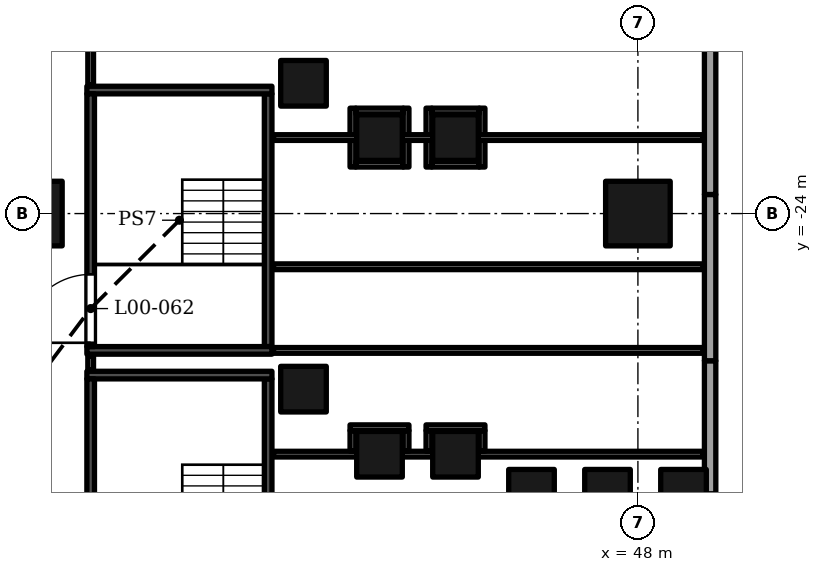
"""IFC4 building model, lengths in metres.
Left out: names, types, materials, properties, quantities, classifications, styles, units other than length and angle.
Written with IfcOpenShell. Run it as: python <this file> out.ifc"""

import sys

from ifc_helpers import new_model, si_unit, direction, frame, frame_2d, origin, origin_2d, place, context, subcontext, project, spatial, rectangle, extrude, element, fill, save


model = new_model("IFC4")
c1 = context("Model", 3, precision=1e-05, world=origin(), true_north=direction((0.0, 1.0)))
c2 = subcontext(c1, "Body", "Model", "MODEL_VIEW")
j1 = project(units=[si_unit("LENGTHUNIT", "METRE"), si_unit("PLANEANGLEUNIT", "RADIAN")], contexts=[c1])
p1 = place(None, origin())
s1 = spatial("IfcSite", under=j1, at=p1, CompositionType="ELEMENT")
p2 = place(p1, origin())
s2 = spatial("IfcBuilding", under=s1, at=p2, CompositionType="ELEMENT")
p3 = place(p2, origin())
s3 = spatial("IfcBuildingStorey", under=s2, at=p3, CompositionType="ELEMENT", Elevation=0.0)
for number, where, z_axis, x_axis in (
    (1, (32.0, -24.0, 0.0), (0.0, 0.0, 1.0), (1.0, 0.0, 0.0)),
    (2, (48.0, -24.0, 0.0), (0.0, 0.0, 1.0), (1.0, 0.0, 0.0)),
):
    element("IfcColumn", number, at=place(p3, frame(where, z_axis=z_axis, x_axis=x_axis)), inside=s3, PredefinedType="COLUMN", context=c2, shape_type="SweptSolid", body=[
        extrude(rectangle(XDim=1.7, YDim=1.7, at=origin_2d()), origin(), (0.0, 0.0, 1.0), 9.0),
    ])
for number, where, z_axis, x_axis in (
    (3, (39.2, -20.572, 0.0), (0.0, 0.0, 1.0), (1.0, 0.0, 0.0)),
    (4, (39.2, -28.62, 0.0), (0.0, 0.0, 1.0), (1.0, 0.0, 0.0)),
    (5, (41.2, -22.001, 0.0), (0.0, 0.0, 1.0), (1.0, 0.0, 0.0)),
    (6, (41.2, -30.333, 0.0), (0.0, 0.0, 1.0), (1.0, 0.0, 0.0)),
    (7, (43.2, -22.001, 0.0), (0.0, 0.0, 1.0), (1.0, 0.0, 0.0)),
    (8, (43.2, -30.333, 0.0), (0.0, 0.0, 1.0), (1.0, 0.0, 0.0)),
    (9, (45.2, -31.333, 0.0), (0.0, 0.0, 1.0), (1.0, 0.0, 0.0)),
    (10, (47.2, -31.333, 0.0), (0.0, 0.0, 1.0), (1.0, 0.0, 0.0)),
    (11, (49.2, -31.333, 0.0), (0.0, 0.0, 1.0), (1.0, 0.0, 0.0)),
):
    element("IfcColumn", number, at=place(p3, frame(where, z_axis=z_axis, x_axis=x_axis)), inside=s3, PredefinedType="COLUMN", context=c2, shape_type="SweptSolid", body=[
        extrude(rectangle(XDim=1.2, YDim=1.2, at=origin_2d()), origin(), (0.0, 0.0, 1.0), 9.0),
    ])
p4 = place(p3, frame((49.9, -31.373, 0.0), z_axis=(0.0, 0.0, 1.0), x_axis=(0.0, 1.0, 0.0)))
e12 = element("IfcWall", 12, at=p4, inside=s3, PredefinedType="ELEMENTEDWALL", context=c2, shape_type="SweptSolid", body=[
    extrude(rectangle(XDim=3.5, YDim=0.3, at=frame_2d((1.75, 0.0))), origin(), (0.0, 0.0, 1.0), 7.6),
])
p5 = place(p4, frame((1.627, 0.0, 0.0)))
e13 = element("IfcOpeningElement", 13, at=p5, cuts=e12, PredefinedType="OPENING", context=c2, shape_type="SweptSolid", body=[
    extrude(rectangle(XDim=1.5, YDim=2.7, at=frame_2d((0.75, 1.35))), frame((0.0, 0.16, 0.0), z_axis=(0.0, -1.0, 0.0), x_axis=(1.0, 0.0, 0.0)), (0.0, 0.0, 1.0), 0.32),
])
p6 = place(p3, frame((49.9, -27.873, 0.0), z_axis=(0.0, 0.0, 1.0), x_axis=(0.0, 1.0, 0.0)))
e14 = element("IfcWall", 14, at=p6, inside=s3, PredefinedType="ELEMENTEDWALL", context=c2, shape_type="SweptSolid", body=[
    extrude(rectangle(XDim=4.375, YDim=0.3, at=frame_2d((2.188, 0.0))), origin(), (0.0, 0.0, 1.0), 7.6),
])
p7 = place(p6, frame((0.373, 0.0, 0.0)))
e15 = element("IfcOpeningElement", 15, at=p7, cuts=e14, PredefinedType="OPENING", context=c2, shape_type="SweptSolid", body=[
    extrude(rectangle(XDim=2.0, YDim=2.4, at=frame_2d((1.0, 1.2))), frame((0.0, 0.16, 0.0), z_axis=(0.0, -1.0, 0.0), x_axis=(1.0, 0.0, 0.0)), (0.0, 0.0, 1.0), 0.32),
])
p8 = place(p3, frame((49.9, -23.498, 0.0), z_axis=(0.0, 0.0, 1.0), x_axis=(0.0, 1.0, 0.0)))
e16 = element("IfcWall", 16, at=p8, inside=s3, PredefinedType="ELEMENTEDWALL", context=c2, shape_type="SweptSolid", body=[
    extrude(rectangle(XDim=8.55, YDim=0.3, at=frame_2d((4.275, 0.0))), origin(), (0.0, 0.0, 1.0), 7.6),
])
p9 = place(p8, frame((2.002, 0.0, 0.0)))
e17 = element("IfcOpeningElement", 17, at=p9, cuts=e16, PredefinedType="OPENING", context=c2, shape_type="SweptSolid", body=[
    extrude(rectangle(XDim=3.0, YDim=2.7, at=frame_2d((1.5, 1.35))), frame((0.0, 0.16, 0.0), z_axis=(0.0, -1.0, 0.0), x_axis=(1.0, 0.0, 0.0)), (0.0, 0.0, 1.0), 0.32),
])
for number, where, z_axis, x_axis in (
    (18, (49.85, -39.79, 9.0), (0.0, 0.0, 1.0), (0.0, 1.0, 0.0)),
    (19, (49.85, -25.093, 9.0), (0.0, 0.0, 1.0), (0.0, 1.0, 0.0)),
):
    element("IfcWall", number, at=place(p3, frame(where, z_axis=z_axis, x_axis=x_axis)), inside=s3, PredefinedType="PARAPET", context=c2, shape_type="SweptSolid", body=[
        extrude(rectangle(XDim=14.698, YDim=0.3, at=frame_2d((7.349, 0.0))), origin(), (0.0, 0.0, 1.0), 1.1),
    ])
p10 = place(p3, frame((33.5, -28.25, 0.0), z_axis=(0.0, 0.0, 1.0), x_axis=(1.0, 0.0, 0.0)))
e20 = element("IfcWall", 20, at=p10, inside=s3, PredefinedType="SOLIDWALL", context=c2, shape_type="SweptSolid", body=[
    extrude(rectangle(XDim=4.87, YDim=0.2, at=frame_2d((2.435, 0.0))), origin(), (0.0, 0.0, 1.0), 8.5),
])
p11 = place(p3, frame((33.6, -35.0, 0.0), z_axis=(0.0, 0.0, 1.0), x_axis=(0.0, 1.0, 0.0)))
e21 = element("IfcWall", 21, at=p11, inside=s3, PredefinedType="SOLIDWALL", context=c2, shape_type="SweptSolid", body=[
    extrude(rectangle(XDim=6.65, YDim=0.2, at=frame_2d((3.325, 0.0))), origin(), (0.0, 0.0, 1.0), 8.5),
])
p12 = place(p11, frame((0.1, 0.0, 0.0)))
e22 = element("IfcOpeningElement", 22, at=p12, cuts=e21, PredefinedType="OPENING", context=c2, shape_type="SweptSolid", body=[
    extrude(rectangle(XDim=1.8, YDim=2.4, at=frame_2d((0.9, 1.2))), frame((0.0, 0.11, 0.0), z_axis=(0.0, -1.0, 0.0), x_axis=(1.0, 0.0, 0.0)), (0.0, 0.0, 1.0), 0.22),
])
p13 = place(p3, frame((38.27, -35.0, 0.0), z_axis=(0.0, 0.0, 1.0), x_axis=(0.0, 1.0, 0.0)))
e23 = element("IfcWall", 23, at=p13, inside=s3, PredefinedType="SOLIDWALL", context=c2, shape_type="SweptSolid", body=[
    extrude(rectangle(XDim=6.65, YDim=0.2, at=frame_2d((3.325, 0.0))), origin(), (0.0, 0.0, 1.0), 8.5),
])
p14 = place(p13, frame((0.1, 0.0, 0.0)))
e24 = element("IfcOpeningElement", 24, at=p14, cuts=e23, PredefinedType="OPENING", context=c2, shape_type="SweptSolid", body=[
    extrude(rectangle(XDim=1.8, YDim=2.4, at=frame_2d((0.9, 1.2))), frame((0.0, 0.11, 0.0), z_axis=(0.0, -1.0, 0.0), x_axis=(1.0, 0.0, 0.0)), (0.0, 0.0, 1.0), 0.22),
])
for number, where, z_axis, x_axis in (
    (25, (33.5, -27.6, 0.0), (0.0, 0.0, 1.0), (1.0, 0.0, 0.0)),
    (26, (33.5, -20.75, 0.0), (0.0, 0.0, 1.0), (1.0, 0.0, 0.0)),
):
    element("IfcWall", number, at=place(p3, frame(where, z_axis=z_axis, x_axis=x_axis)), inside=s3, PredefinedType="SOLIDWALL", context=c2, shape_type="SweptSolid", body=[
        extrude(rectangle(XDim=4.87, YDim=0.2, at=frame_2d((2.435, 0.0))), origin(), (0.0, 0.0, 1.0), 8.5),
    ])
p15 = place(p3, frame((33.6, -27.5, 0.0), z_axis=(0.0, 0.0, 1.0), x_axis=(0.0, 1.0, 0.0)))
e27 = element("IfcWall", 27, at=p15, inside=s3, PredefinedType="SOLIDWALL", context=c2, shape_type="SweptSolid", body=[
    extrude(rectangle(XDim=6.65, YDim=0.2, at=frame_2d((3.325, 0.0))), origin(), (0.0, 0.0, 1.0), 8.5),
])
p16 = place(p15, frame((0.1, 0.0, 0.0)))
e28 = element("IfcOpeningElement", 28, at=p16, cuts=e27, PredefinedType="OPENING", context=c2, shape_type="SweptSolid", body=[
    extrude(rectangle(XDim=1.8, YDim=2.4, at=frame_2d((0.9, 1.2))), frame((0.0, 0.11, 0.0), z_axis=(0.0, -1.0, 0.0), x_axis=(1.0, 0.0, 0.0)), (0.0, 0.0, 1.0), 0.22),
])
p17 = place(p3, frame((38.27, -27.5, 0.0), z_axis=(0.0, 0.0, 1.0), x_axis=(0.0, 1.0, 0.0)))
e29 = element("IfcWall", 29, at=p17, inside=s3, PredefinedType="SOLIDWALL", context=c2, shape_type="SweptSolid", body=[
    extrude(rectangle(XDim=6.65, YDim=0.2, at=frame_2d((3.325, 0.0))), origin(), (0.0, 0.0, 1.0), 8.5),
])
p18 = place(p17, frame((0.1, 0.0, 0.0)))
e30 = element("IfcOpeningElement", 30, at=p18, cuts=e29, PredefinedType="OPENING", context=c2, shape_type="SweptSolid", body=[
    extrude(rectangle(XDim=1.8, YDim=2.4, at=frame_2d((0.9, 1.2))), frame((0.0, 0.11, 0.0), z_axis=(0.0, -1.0, 0.0), x_axis=(1.0, 0.0, 0.0)), (0.0, 0.0, 1.0), 0.22),
])
p19 = place(p3, frame((38.41, -30.33, 0.0), z_axis=(0.0, 0.0, 1.0), x_axis=(1.0, 0.0, 0.0)))
e31 = element("IfcWall", 31, at=p19, inside=s3, PredefinedType="PARTITIONING", context=c2, shape_type="SweptSolid", body=[
    extrude(rectangle(XDim=2.19, YDim=0.15, at=frame_2d((1.095, 0.0))), origin(), (0.0, 0.0, 1.0), 8.5),
])
p20 = place(p3, frame((41.8, -30.33, 0.0), z_axis=(0.0, 0.0, 1.0), x_axis=(1.0, 0.0, 0.0)))
e32 = element("IfcWall", 32, at=p20, inside=s3, PredefinedType="PARTITIONING", context=c2, shape_type="SweptSolid", body=[
    extrude(rectangle(XDim=0.8, YDim=0.15, at=frame_2d((0.4, 0.0))), origin(), (0.0, 0.0, 1.0), 8.5),
])
p21 = place(p3, frame((43.8, -30.33, 0.0), z_axis=(0.0, 0.0, 1.0), x_axis=(1.0, 0.0, 0.0)))
e33 = element("IfcWall", 33, at=p21, inside=s3, PredefinedType="PARTITIONING", context=c2, shape_type="SweptSolid", body=[
    extrude(rectangle(XDim=5.92, YDim=0.15, at=frame_2d((2.96, 0.0))), origin(), (0.0, 0.0, 1.0), 7.6),
])
for number, where, z_axis, x_axis in (
    (34, (40.5, -30.255, 0.0), (0.0, 0.0, 1.0), (0.0, 1.0, 0.0)),
    (35, (41.9, -30.255, 0.0), (0.0, 0.0, 1.0), (0.0, 1.0, 0.0)),
    (36, (42.5, -30.255, 0.0), (0.0, 0.0, 1.0), (0.0, 1.0, 0.0)),
    (37, (43.9, -30.255, 0.0), (0.0, 0.0, 1.0), (0.0, 1.0, 0.0)),
):
    element("IfcWall", number, at=place(p3, frame(where, z_axis=z_axis, x_axis=x_axis)), inside=s3, PredefinedType="PARTITIONING", context=c2, shape_type="SweptSolid", body=[
        extrude(rectangle(XDim=0.545, YDim=0.15, at=frame_2d((0.272, 0.0))), origin(), (0.0, 0.0, 1.0), 8.5),
    ])
for number, where, z_axis, x_axis in (
    (38, (40.425, -29.635, 0.0), (0.0, 0.0, 1.0), (1.0, 0.0, 0.0)),
    (39, (42.425, -29.635, 0.0), (0.0, 0.0, 1.0), (1.0, 0.0, 0.0)),
):
    element("IfcWall", number, at=place(p3, frame(where, z_axis=z_axis, x_axis=x_axis)), inside=s3, PredefinedType="PARTITIONING", context=c2, shape_type="SweptSolid", body=[
        extrude(rectangle(XDim=1.55, YDim=0.15, at=frame_2d((0.775, 0.0))), origin(), (0.0, 0.0, 1.0), 8.5),
    ])
p22 = place(p3, frame((33.6, -28.11, 0.0), z_axis=(0.0, 0.0, 1.0), x_axis=(0.0, 1.0, 0.0)))
e40 = element("IfcWall", 40, at=p22, inside=s3, PredefinedType="PARTITIONING", context=c2, shape_type="SweptSolid", body=[
    extrude(rectangle(XDim=0.37, YDim=0.15, at=frame_2d((0.185, 0.0))), origin(), (0.0, 0.0, 1.0), 8.5),
])
p23 = place(p3, frame((38.41, -27.601, 0.0), z_axis=(0.0, 0.0, 1.0), x_axis=(1.0, 0.0, 0.0)))
e41 = element("IfcWall", 41, at=p23, inside=s3, PredefinedType="PARTITIONING", context=c2, shape_type="SweptSolid", body=[
    extrude(rectangle(XDim=11.31, YDim=0.151, at=frame_2d((5.655, 0.0))), origin(), (0.0, 0.0, 1.0), 7.6),
])
p24 = place(p23, frame((5.04, 0.0, 0.0)))
e42 = element("IfcOpeningElement", 42, at=p24, cuts=e41, PredefinedType="OPENING", context=c2, shape_type="SweptSolid", body=[
    extrude(rectangle(XDim=1.2, YDim=2.1, at=frame_2d((0.6, 1.05))), frame((0.0, 0.085, 0.0), z_axis=(0.0, -1.0, 0.0), x_axis=(1.0, 0.0, 0.0)), (0.0, 0.0, 1.0), 0.171),
])
p25 = place(p3, frame((38.41, -25.399, 0.0), z_axis=(0.0, 0.0, 1.0), x_axis=(1.0, 0.0, 0.0)))
e43 = element("IfcWall", 43, at=p25, inside=s3, PredefinedType="PARTITIONING", context=c2, shape_type="SweptSolid", body=[
    extrude(rectangle(XDim=11.31, YDim=0.151, at=frame_2d((5.655, 0.0))), origin(), (0.0, 0.0, 1.0), 7.6),
])
p26 = place(p25, frame((4.961, 0.0, 0.0)))
e44 = element("IfcOpeningElement", 44, at=p26, cuts=e43, PredefinedType="OPENING", context=c2, shape_type="SweptSolid", body=[
    extrude(rectangle(XDim=1.2, YDim=2.1, at=frame_2d((0.6, 1.05))), frame((0.0, 0.085, 0.0), z_axis=(0.0, -1.0, 0.0), x_axis=(1.0, 0.0, 0.0)), (0.0, 0.0, 1.0), 0.171),
])
p27 = place(p3, frame((40.5, -22.776, 0.0), z_axis=(0.0, 0.0, 1.0), x_axis=(0.0, 1.0, 0.0)))
e45 = element("IfcWall", 45, at=p27, inside=s3, PredefinedType="PARTITIONING", context=c2, shape_type="SweptSolid", body=[
    extrude(rectangle(XDim=1.55, YDim=0.15, at=frame_2d((0.775, 0.0))), origin(), (0.0, 0.0, 1.0), 8.5),
])
p28 = place(p3, frame((40.575, -22.701, 0.0), z_axis=(0.0, 0.0, 1.0), x_axis=(1.0, 0.0, 0.0)))
e46 = element("IfcWall", 46, at=p28, inside=s3, PredefinedType="PARTITIONING", context=c2, shape_type="SweptSolid", body=[
    extrude(rectangle(XDim=1.25, YDim=0.15, at=frame_2d((0.625, 0.0))), origin(), (0.0, 0.0, 1.0), 8.5),
])
for number, where, z_axis, x_axis in (
    (47, (41.9, -22.776, 0.0), (0.0, 0.0, 1.0), (0.0, 1.0, 0.0)),
    (48, (42.5, -22.776, 0.0), (0.0, 0.0, 1.0), (0.0, 1.0, 0.0)),
):
    element("IfcWall", number, at=place(p3, frame(where, z_axis=z_axis, x_axis=x_axis)), inside=s3, PredefinedType="PARTITIONING", context=c2, shape_type="SweptSolid", body=[
        extrude(rectangle(XDim=1.55, YDim=0.15, at=frame_2d((0.775, 0.0))), origin(), (0.0, 0.0, 1.0), 8.5),
    ])
p29 = place(p3, frame((42.575, -22.701, 0.0), z_axis=(0.0, 0.0, 1.0), x_axis=(1.0, 0.0, 0.0)))
e49 = element("IfcWall", 49, at=p29, inside=s3, PredefinedType="PARTITIONING", context=c2, shape_type="SweptSolid", body=[
    extrude(rectangle(XDim=1.25, YDim=0.15, at=frame_2d((0.625, 0.0))), origin(), (0.0, 0.0, 1.0), 8.5),
])
p30 = place(p3, frame((43.9, -22.776, 0.0), z_axis=(0.0, 0.0, 1.0), x_axis=(0.0, 1.0, 0.0)))
e50 = element("IfcWall", 50, at=p30, inside=s3, PredefinedType="PARTITIONING", context=c2, shape_type="SweptSolid", body=[
    extrude(rectangle(XDim=1.55, YDim=0.15, at=frame_2d((0.775, 0.0))), origin(), (0.0, 0.0, 1.0), 8.5),
])
p31 = place(p3, frame((38.41, -22.0, 0.0), z_axis=(0.0, 0.0, 1.0), x_axis=(1.0, 0.0, 0.0)))
e51 = element("IfcWall", 51, at=p31, inside=s3, PredefinedType="PARTITIONING", context=c2, shape_type="SweptSolid", body=[
    extrude(rectangle(XDim=2.19, YDim=0.15, at=frame_2d((1.095, 0.0))), origin(), (0.0, 0.0, 1.0), 8.5),
])
p32 = place(p3, frame((41.8, -22.0, 0.0), z_axis=(0.0, 0.0, 1.0), x_axis=(1.0, 0.0, 0.0)))
e52 = element("IfcWall", 52, at=p32, inside=s3, PredefinedType="PARTITIONING", context=c2, shape_type="SweptSolid", body=[
    extrude(rectangle(XDim=0.8, YDim=0.15, at=frame_2d((0.4, 0.0))), origin(), (0.0, 0.0, 1.0), 8.5),
])
p33 = place(p3, frame((43.8, -22.0, 0.0), z_axis=(0.0, 0.0, 1.0), x_axis=(1.0, 0.0, 0.0)))
e53 = element("IfcWall", 53, at=p33, inside=s3, PredefinedType="PARTITIONING", context=c2, shape_type="SweptSolid", body=[
    extrude(rectangle(XDim=5.92, YDim=0.15, at=frame_2d((2.96, 0.0))), origin(), (0.0, 0.0, 1.0), 7.6),
])
for number, where, z_axis, x_axis in (
    (54, (40.575, -21.301, 0.0), (0.0, 0.0, 1.0), (1.0, 0.0, 0.0)),
    (55, (42.575, -21.301, 0.0), (0.0, 0.0, 1.0), (1.0, 0.0, 0.0)),
):
    element("IfcWall", number, at=place(p3, frame(where, z_axis=z_axis, x_axis=x_axis)), inside=s3, PredefinedType="PARTITIONING", context=c2, shape_type="SweptSolid", body=[
        extrude(rectangle(XDim=1.25, YDim=0.15, at=frame_2d((0.625, 0.0))), origin(), (0.0, 0.0, 1.0), 8.5),
    ])
p34 = place(p3, frame((33.6, -20.61, 0.0), z_axis=(0.0, 0.0, 1.0), x_axis=(0.0, 1.0, 0.0)))
e56 = element("IfcWall", 56, at=p34, inside=s3, PredefinedType="PARTITIONING", context=c2, shape_type="SweptSolid", body=[
    extrude(rectangle(XDim=8.97, YDim=0.15, at=frame_2d((4.485, 0.0))), origin(), (0.0, 0.0, 1.0), 8.5),
])
p35 = place(p34, frame((2.89, 0.0, 0.0)))
e57 = element("IfcOpeningElement", 57, at=p35, cuts=e56, PredefinedType="OPENING", context=c2, shape_type="SweptSolid", body=[
    extrude(rectangle(XDim=1.2, YDim=2.1, at=frame_2d((0.6, 1.05))), frame((0.0, 0.085, 0.0), z_axis=(0.0, -1.0, 0.0), x_axis=(1.0, 0.0, 0.0)), (0.0, 0.0, 1.0), 0.17),
])
p36 = place(p5, origin())
e58 = element("IfcDoor", 58, at=p36, inside=s3, OperationType="DOUBLE_DOOR_SINGLE_SWING", PredefinedType="DOOR", context=c2, shape_type="SweptSolid", body=[
    extrude(rectangle(XDim=1.5, YDim=2.7, at=frame_2d((0.75, 1.35))), frame((0.0, 0.025, 0.0), z_axis=(0.0, -1.0, 0.0), x_axis=(1.0, 0.0, 0.0)), (0.0, 0.0, 1.0), 0.05),
])
fill(e13, e58)
p37 = place(p7, origin())
e59 = element("IfcDoor", 59, at=p37, inside=s3, OperationType="DOUBLE_DOOR_SINGLE_SWING", PredefinedType="DOOR", context=c2, shape_type="SweptSolid", body=[
    extrude(rectangle(XDim=2.0, YDim=2.4, at=frame_2d((1.0, 1.2))), frame((0.0, 0.025, 0.0), z_axis=(0.0, -1.0, 0.0), x_axis=(1.0, 0.0, 0.0)), (0.0, 0.0, 1.0), 0.05),
])
fill(e15, e59)
p38 = place(p9, origin())
e60 = element("IfcDoor", 60, at=p38, inside=s3, OperationType="DOUBLE_DOOR_SINGLE_SWING", PredefinedType="DOOR", context=c2, shape_type="SweptSolid", body=[
    extrude(rectangle(XDim=3.0, YDim=2.7, at=frame_2d((1.5, 1.35))), frame((0.0, 0.025, 0.0), z_axis=(0.0, -1.0, 0.0), x_axis=(1.0, 0.0, 0.0)), (0.0, 0.0, 1.0), 0.05),
])
fill(e17, e60)
p39 = place(p16, origin())
e61 = element("IfcDoor", 61, at=p39, inside=s3, OperationType="DOUBLE_DOOR_SINGLE_SWING", PredefinedType="DOOR", context=c2, shape_type="SweptSolid", body=[
    extrude(rectangle(XDim=1.8, YDim=2.4, at=frame_2d((0.9, 1.2))), frame((0.0, 0.025, 0.0), z_axis=(0.0, -1.0, 0.0), x_axis=(1.0, 0.0, 0.0)), (0.0, 0.0, 1.0), 0.05),
])
fill(e28, e61)
p40 = place(p18, origin())
e62 = element("IfcDoor", 62, at=p40, inside=s3, OperationType="DOUBLE_DOOR_SINGLE_SWING", PredefinedType="DOOR", context=c2, shape_type="SweptSolid", body=[
    extrude(rectangle(XDim=1.8, YDim=2.4, at=frame_2d((0.9, 1.2))), frame((0.0, 0.025, 0.0), z_axis=(0.0, -1.0, 0.0), x_axis=(1.0, 0.0, 0.0)), (0.0, 0.0, 1.0), 0.05),
])
fill(e30, e62)
p41 = place(p24, origin())
e63 = element("IfcDoor", 63, at=p41, inside=s3, OperationType="SINGLE_SWING_LEFT", PredefinedType="DOOR", context=c2, shape_type="SweptSolid", body=[
    extrude(rectangle(XDim=1.2, YDim=2.1, at=frame_2d((0.6, 1.05))), frame((0.0, 0.025, 0.0), z_axis=(0.0, -1.0, 0.0), x_axis=(1.0, 0.0, 0.0)), (0.0, 0.0, 1.0), 0.05),
])
fill(e42, e63)
p42 = place(p26, origin())
e64 = element("IfcDoor", 64, at=p42, inside=s3, OperationType="SINGLE_SWING_LEFT", PredefinedType="DOOR", context=c2, shape_type="SweptSolid", body=[
    extrude(rectangle(XDim=1.2, YDim=2.1, at=frame_2d((0.6, 1.05))), frame((0.0, 0.025, 0.0), z_axis=(0.0, -1.0, 0.0), x_axis=(1.0, 0.0, 0.0)), (0.0, 0.0, 1.0), 0.05),
])
fill(e44, e64)
save(model, sys.argv[1])
